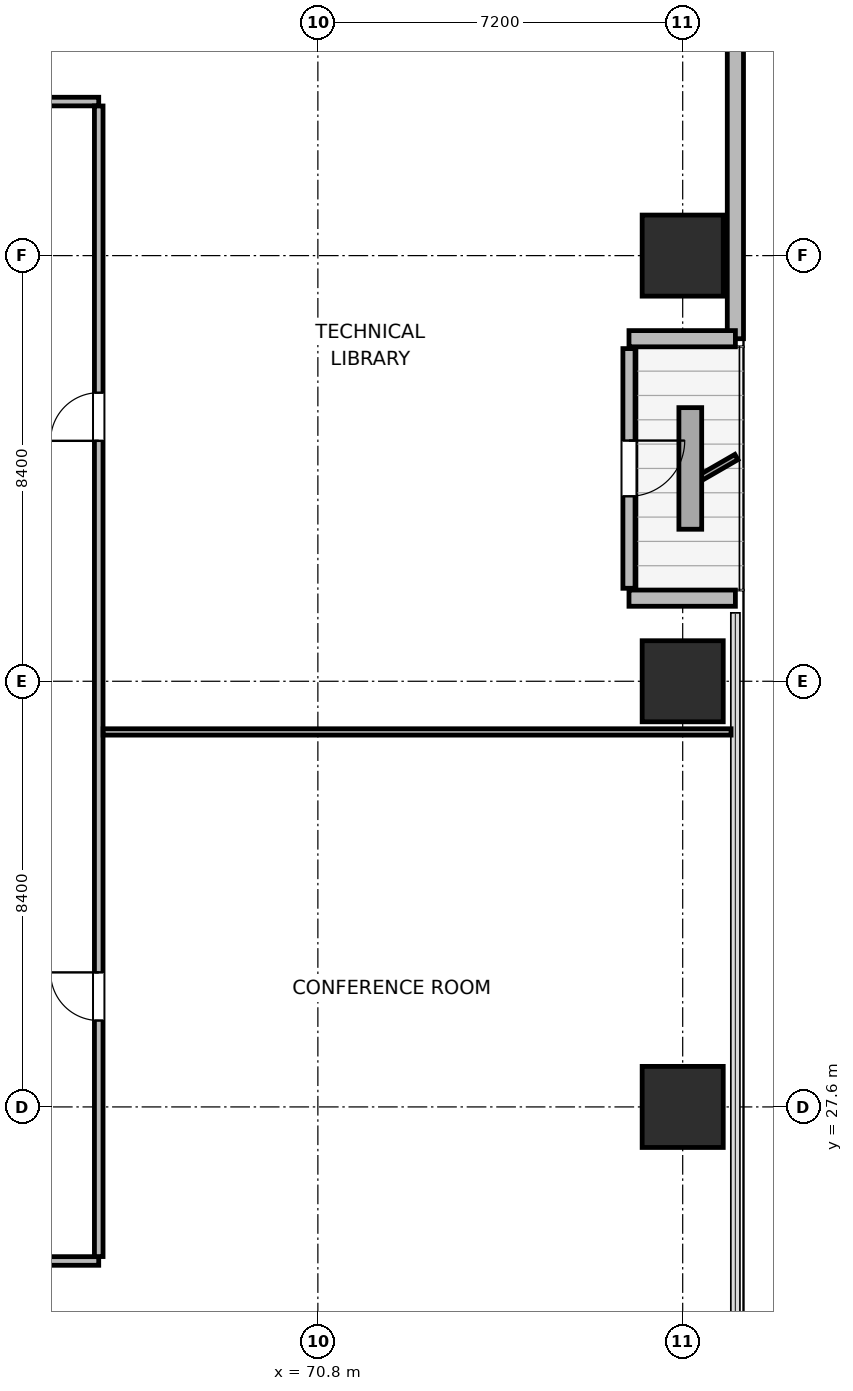
"""IFC4 building model, lengths in metres.
Left out: names, types, materials, properties, quantities, classifications, styles, units other than length and angle.
Written with IfcOpenShell. Run it as: python <this file> out.ifc"""

import sys

from ifc_helpers import new_model, si_unit, direction, frame, frame_2d, origin, origin_2d, place, context, subcontext, project, spatial, rectangle, extrude, element, fill, save


model = new_model("IFC4")
c1 = context("Model", 3, precision=1e-05, world=origin(), true_north=direction((0.0, 1.0)))
c2 = subcontext(c1, "Body", "Model", "MODEL_VIEW")
j1 = project(units=[si_unit("LENGTHUNIT", "METRE"), si_unit("PLANEANGLEUNIT", "RADIAN")], contexts=[c1])
p1 = place(None, origin())
s1 = spatial("IfcSite", under=j1, at=p1, CompositionType="ELEMENT")
p2 = place(p1, origin())
s2 = spatial("IfcBuilding", under=s1, at=p2, CompositionType="ELEMENT")
p3 = place(p2, frame((0.0, 0.0, 76.8)))
s3 = spatial("IfcBuildingStorey", under=s2, at=p3, CompositionType="ELEMENT", Elevation=76.8)
for number, where, z_axis, x_axis in (
    (1, (78.0, 27.6, 0.0), (0.0, 0.0, 1.0), (1.0, 0.0, 0.0)),
    (2, (78.0, 36.0, 0.0), (0.0, 0.0, 1.0), (1.0, 0.0, 0.0)),
    (3, (78.0, 44.4, 0.0), (0.0, 0.0, 1.0), (1.0, 0.0, 0.0)),
):
    element("IfcColumn", number, at=place(p3, frame(where, z_axis=z_axis, x_axis=x_axis)), inside=s3, PredefinedType="COLUMN", context=c2, shape_type="SweptSolid", body=[
        extrude(rectangle(XDim=1.6, YDim=1.6, at=origin_2d()), origin(), (0.0, 0.0, 1.0), 3.9),
    ])
p4 = place(p3, frame((79.04, 56.979, 0.0), z_axis=(0.0, 0.0, 1.0), x_axis=(0.0, -1.0, 0.0)))
e4 = element("IfcWall", 4, at=p4, inside=s3, PredefinedType="SOLIDWALL", context=c2, shape_type="SweptSolid", body=[
    extrude(rectangle(XDim=14.219, YDim=0.32, at=frame_2d((7.109, 0.0))), origin(), (0.0, 0.0, 1.0), 3.6),
])
p5 = place(p3, frame((79.04, 42.76, 0.0), z_axis=(0.0, 0.0, 1.0), x_axis=(-1.0, 0.0, 0.0)))
e5 = element("IfcWall", 5, at=p5, inside=s3, PredefinedType="SOLIDWALL", context=c2, shape_type="SweptSolid", body=[
    extrude(rectangle(XDim=2.1, YDim=0.32, at=frame_2d((1.05, 0.0))), origin(), (0.0, 0.0, 1.0), 2.245),
])
p6 = place(p3, frame((76.94, 42.565, 0.0), z_axis=(0.0, 0.0, 1.0), x_axis=(0.0, -1.0, 0.0)))
e6 = element("IfcWall", 6, at=p6, inside=s3, PredefinedType="SOLIDWALL", context=c2, shape_type="SweptSolid", body=[
    extrude(rectangle(XDim=4.73, YDim=0.24, at=frame_2d((2.365, 0.0))), origin(), (0.0, 0.0, 1.0), 3.122),
])
p7 = place(p6, frame((1.815, 0.0, 0.0)))
e7 = element("IfcOpeningElement", 7, at=p7, cuts=e6, PredefinedType="OPENING", context=c2, shape_type="SweptSolid", body=[
    extrude(rectangle(XDim=1.1, YDim=2.04, at=frame_2d((0.55, 1.02))), frame((0.0, 0.13, 0.0), z_axis=(0.0, -1.0, 0.0), x_axis=(1.0, 0.0, 0.0)), (0.0, 0.0, 1.0), 0.26),
])
p8 = place(p3, frame((76.94, 37.64, 0.0), z_axis=(0.0, 0.0, 1.0), x_axis=(1.0, 0.0, 0.0)))
e8 = element("IfcWall", 8, at=p8, inside=s3, PredefinedType="SOLIDWALL", context=c2, shape_type="SweptSolid", body=[
    extrude(rectangle(XDim=2.1, YDim=0.32, at=frame_2d((1.05, 0.0))), origin(), (0.0, 0.0, 1.0), 2.245),
])
p9 = place(p3, frame((29.525, 24.56, 0.0), z_axis=(0.0, 0.0, 1.0), x_axis=(1.0, 0.0, 0.0)))
e9 = element("IfcWall", 9, at=p9, inside=s3, PredefinedType="PARTITIONING", context=c2, shape_type="SweptSolid", body=[
    extrude(rectangle(XDim=36.95, YDim=0.17, at=frame_2d((18.475, 0.0))), origin(), (0.0, 0.0, 1.0), 3.6),
])
p10 = place(p9, frame((3.578, 0.0, 0.0)))
e10 = element("IfcOpeningElement", 10, at=p10, cuts=e9, PredefinedType="OPENING", context=c2, shape_type="SweptSolid", body=[
    extrude(rectangle(XDim=0.95, YDim=2.04, at=frame_2d((0.475, 1.02))), frame((0.0, 0.095, 0.0), z_axis=(0.0, -1.0, 0.0), x_axis=(1.0, 0.0, 0.0)), (0.0, 0.0, 1.0), 0.19),
])
p11 = place(p9, frame((10.615, 0.0, 0.0)))
e11 = element("IfcOpeningElement", 11, at=p11, cuts=e9, PredefinedType="OPENING", context=c2, shape_type="SweptSolid", body=[
    extrude(rectangle(XDim=0.95, YDim=2.04, at=frame_2d((0.475, 1.02))), frame((0.0, 0.095, 0.0), z_axis=(0.0, -1.0, 0.0), x_axis=(1.0, 0.0, 0.0)), (0.0, 0.0, 1.0), 0.19),
])
p12 = place(p9, frame((17.525, 0.0, 0.0)))
e12 = element("IfcOpeningElement", 12, at=p12, cuts=e9, PredefinedType="OPENING", context=c2, shape_type="SweptSolid", body=[
    extrude(rectangle(XDim=0.95, YDim=2.04, at=frame_2d((0.475, 1.02))), frame((0.0, 0.095, 0.0), z_axis=(0.0, -1.0, 0.0), x_axis=(1.0, 0.0, 0.0)), (0.0, 0.0, 1.0), 0.19),
])
p13 = place(p9, frame((24.905, 0.0, 0.0)))
e13 = element("IfcOpeningElement", 13, at=p13, cuts=e9, PredefinedType="OPENING", context=c2, shape_type="SweptSolid", body=[
    extrude(rectangle(XDim=0.95, YDim=2.04, at=frame_2d((0.475, 1.02))), frame((0.0, 0.095, 0.0), z_axis=(0.0, -1.0, 0.0), x_axis=(1.0, 0.0, 0.0)), (0.0, 0.0, 1.0), 0.19),
])
p14 = place(p9, frame((32.418, 0.0, 0.0)))
e14 = element("IfcOpeningElement", 14, at=p14, cuts=e9, PredefinedType="OPENING", context=c2, shape_type="SweptSolid", body=[
    extrude(rectangle(XDim=0.95, YDim=2.04, at=frame_2d((0.475, 1.02))), frame((0.0, 0.095, 0.0), z_axis=(0.0, -1.0, 0.0), x_axis=(1.0, 0.0, 0.0)), (0.0, 0.0, 1.0), 0.19),
])
p15 = place(p3, frame((29.525, 47.44, 0.0), z_axis=(0.0, 0.0, 1.0), x_axis=(1.0, 0.0, 0.0)))
e15 = element("IfcWall", 15, at=p15, inside=s3, PredefinedType="PARTITIONING", context=c2, shape_type="SweptSolid", body=[
    extrude(rectangle(XDim=36.95, YDim=0.17, at=frame_2d((18.475, 0.0))), origin(), (0.0, 0.0, 1.0), 3.6),
])
p16 = place(p15, frame((1.403, 0.0, 0.0)))
e16 = element("IfcOpeningElement", 16, at=p16, cuts=e15, PredefinedType="OPENING", context=c2, shape_type="SweptSolid", body=[
    extrude(rectangle(XDim=0.95, YDim=2.04, at=frame_2d((0.475, 1.02))), frame((0.0, 0.095, 0.0), z_axis=(0.0, -1.0, 0.0), x_axis=(1.0, 0.0, 0.0)), (0.0, 0.0, 1.0), 0.19),
])
p17 = place(p15, frame((14.64, 0.0, 0.0)))
e17 = element("IfcOpeningElement", 17, at=p17, cuts=e15, PredefinedType="OPENING", context=c2, shape_type="SweptSolid", body=[
    extrude(rectangle(XDim=0.95, YDim=2.04, at=frame_2d((0.475, 1.02))), frame((0.0, 0.095, 0.0), z_axis=(0.0, -1.0, 0.0), x_axis=(1.0, 0.0, 0.0)), (0.0, 0.0, 1.0), 0.19),
])
p18 = place(p15, frame((31.237, 0.0, 0.0)))
e18 = element("IfcOpeningElement", 18, at=p18, cuts=e15, PredefinedType="OPENING", context=c2, shape_type="SweptSolid", body=[
    extrude(rectangle(XDim=0.95, YDim=2.04, at=frame_2d((0.475, 1.02))), frame((0.0, 0.095, 0.0), z_axis=(0.0, -1.0, 0.0), x_axis=(1.0, 0.0, 0.0)), (0.0, 0.0, 1.0), 0.19),
])
p19 = place(p3, frame((66.475, 24.647, 0.0), z_axis=(0.0, 0.0, 1.0), x_axis=(0.0, 1.0, 0.0)))
e19 = element("IfcWall", 19, at=p19, inside=s3, PredefinedType="PARTITIONING", context=c2, shape_type="SweptSolid", body=[
    extrude(rectangle(XDim=22.706, YDim=0.17, at=frame_2d((11.353, 0.0))), origin(), (0.0, 0.0, 1.0), 3.6),
])
p20 = place(p19, frame((4.658, 0.0, 0.0)))
e20 = element("IfcOpeningElement", 20, at=p20, cuts=e19, PredefinedType="OPENING", context=c2, shape_type="SweptSolid", body=[
    extrude(rectangle(XDim=0.95, YDim=2.04, at=frame_2d((0.475, 1.02))), frame((0.0, 0.095, 0.0), z_axis=(0.0, -1.0, 0.0), x_axis=(1.0, 0.0, 0.0)), (0.0, 0.0, 1.0), 0.19),
])
p21 = place(p19, frame((16.098, 0.0, 0.0)))
e21 = element("IfcOpeningElement", 21, at=p21, cuts=e19, PredefinedType="OPENING", context=c2, shape_type="SweptSolid", body=[
    extrude(rectangle(XDim=0.95, YDim=2.04, at=frame_2d((0.475, 1.02))), frame((0.0, 0.095, 0.0), z_axis=(0.0, -1.0, 0.0), x_axis=(1.0, 0.0, 0.0)), (0.0, 0.0, 1.0), 0.19),
])
p22 = place(p3, frame((66.562, 35.0, 0.0), z_axis=(0.0, 0.0, 1.0), x_axis=(1.0, 0.0, 0.0)))
e22 = element("IfcWall", 22, at=p22, inside=s3, PredefinedType="PARTITIONING", context=c2, shape_type="SweptSolid", body=[
    extrude(rectangle(XDim=12.393, YDim=0.125, at=frame_2d((6.197, 0.0))), origin(), (0.0, 0.0, 1.0), 3.6),
])
p23 = place(p7, origin())
e23 = element("IfcDoor", 23, at=p23, inside=s3, OperationType="SINGLE_SWING_LEFT", PredefinedType="DOOR", context=c2, shape_type="SweptSolid", body=[
    extrude(rectangle(XDim=1.1, YDim=2.04, at=frame_2d((0.55, 1.02))), frame((0.0, 0.025, 0.0), z_axis=(0.0, -1.0, 0.0), x_axis=(1.0, 0.0, 0.0)), (0.0, 0.0, 1.0), 0.05),
])
fill(e7, e23)
p24 = place(p20, origin())
e24 = element("IfcDoor", 24, at=p24, inside=s3, OperationType="SINGLE_SWING_RIGHT", PredefinedType="DOOR", context=c2, shape_type="SweptSolid", body=[
    extrude(rectangle(XDim=0.95, YDim=2.04, at=frame_2d((0.475, 1.02))), frame((0.0, 0.025, 0.0), z_axis=(0.0, -1.0, 0.0), x_axis=(1.0, 0.0, 0.0)), (0.0, 0.0, 1.0), 0.05),
])
fill(e20, e24)
p25 = place(p21, origin())
e25 = element("IfcDoor", 25, at=p25, inside=s3, OperationType="SINGLE_SWING_LEFT", PredefinedType="DOOR", context=c2, shape_type="SweptSolid", body=[
    extrude(rectangle(XDim=0.95, YDim=2.04, at=frame_2d((0.475, 1.02))), frame((0.0, 0.025, 0.0), z_axis=(0.0, -1.0, 0.0), x_axis=(1.0, 0.0, 0.0)), (0.0, 0.0, 1.0), 0.05),
])
fill(e21, e25)
save(model, sys.argv[1])
